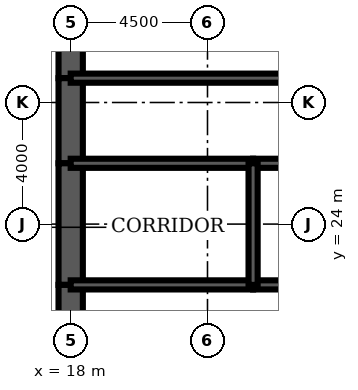
"""IFC4 building model, lengths in metres.
Left out: names, types, materials, properties, quantities, classifications, styles, units other than length and angle.
Written with IfcOpenShell. Run it as: python <this file> out.ifc"""

import sys

from ifc_helpers import new_model, si_unit, direction, frame, frame_2d, origin, place, context, subcontext, project, spatial, rectangle, extrude, element, fill, save


model = new_model("IFC4")
c1 = context("Model", 3, precision=1e-05, world=origin(), true_north=direction((0.0, 1.0)))
c2 = subcontext(c1, "Body", "Model", "MODEL_VIEW")
j1 = project(units=[si_unit("LENGTHUNIT", "METRE"), si_unit("PLANEANGLEUNIT", "RADIAN")], contexts=[c1])
p1 = place(None, origin())
s1 = spatial("IfcSite", under=j1, at=p1, CompositionType="ELEMENT")
p2 = place(p1, origin())
s2 = spatial("IfcBuilding", under=s1, at=p2, CompositionType="ELEMENT")
p3 = place(p2, frame((0.0, 0.0, 211.0)))
s3 = spatial("IfcBuildingStorey", under=s2, at=p3, CompositionType="ELEMENT", Elevation=211.0)
p4 = place(p3, frame((18.0, 32.0, 0.0), z_axis=(0.0, 0.0, 1.0), x_axis=(0.0, -1.0, 0.0)))
e1 = element("IfcWall", 1, at=p4, inside=s3, PredefinedType="SHEAR", context=c2, shape_type="SweptSolid", body=[
    extrude(rectangle(XDim=3.2, YDim=0.8, at=frame_2d((1.6, 0.0))), origin(), (0.0, 0.0, 1.0), 4.2),
])
p5 = place(p3, frame((18.0, 28.8, 0.0), z_axis=(0.0, 0.0, 1.0), x_axis=(0.0, -1.0, 0.0)))
e2 = element("IfcWall", 2, at=p5, inside=s3, PredefinedType="SHEAR", context=c2, shape_type="SweptSolid", body=[
    extrude(rectangle(XDim=2.8, YDim=0.8, at=frame_2d((1.4, 0.0))), origin(), (0.0, 0.0, 1.0), 4.2),
])
p6 = place(p5, frame((0.4, 0.0, 0.0)))
e3 = element("IfcOpeningElement", 3, at=p6, cuts=e2, PredefinedType="OPENING", context=c2, shape_type="SweptSolid", body=[
    extrude(rectangle(XDim=1.8, YDim=2.1, at=frame_2d((0.9, 1.05))), frame((0.0, 0.41, 0.0), z_axis=(0.0, -1.0, 0.0), x_axis=(1.0, 0.0, 0.0)), (0.0, 0.0, 1.0), 0.82),
])
p7 = place(p3, frame((18.0, 26.0, 0.0), z_axis=(0.0, 0.0, 1.0), x_axis=(0.0, -1.0, 0.0)))
e4 = element("IfcWall", 4, at=p7, inside=s3, PredefinedType="SHEAR", context=c2, shape_type="SweptSolid", body=[
    extrude(rectangle(XDim=4.0, YDim=0.8, at=frame_2d((2.0, 0.0))), origin(), (0.0, 0.0, 1.0), 4.2),
])
p8 = place(p3, frame((18.0, 22.0, 0.0), z_axis=(0.0, 0.0, 1.0), x_axis=(0.0, -1.0, 0.0)))
e5 = element("IfcWall", 5, at=p8, inside=s3, PredefinedType="SHEAR", context=c2, shape_type="SweptSolid", body=[
    extrude(rectangle(XDim=2.8, YDim=0.8, at=frame_2d((1.4, 0.0))), origin(), (0.0, 0.0, 1.0), 4.2),
])
p9 = place(p8, frame((0.6, 0.0, 0.0)))
e6 = element("IfcOpeningElement", 6, at=p9, cuts=e5, PredefinedType="OPENING", context=c2, shape_type="SweptSolid", body=[
    extrude(rectangle(XDim=1.8, YDim=2.1, at=frame_2d((0.9, 1.05))), frame((0.0, 0.41, 0.0), z_axis=(0.0, -1.0, 0.0), x_axis=(1.0, 0.0, 0.0)), (0.0, 0.0, 1.0), 0.82),
])
p10 = place(p3, frame((18.0, 28.8, 0.0), z_axis=(0.0, 0.0, 1.0), x_axis=(1.0, 0.0, 0.0)))
e7 = element("IfcWall", 7, at=p10, inside=s3, PredefinedType="SOLIDWALL", context=c2, shape_type="SweptSolid", body=[
    extrude(rectangle(XDim=9.0, YDim=0.3, at=frame_2d((4.5, 0.0))), origin(), (0.0, 0.0, 1.0), 4.2),
])
p11 = place(p10, frame((0.65, 0.0, 0.0)))
e8 = element("IfcOpeningElement", 8, at=p11, cuts=e7, PredefinedType="OPENING", context=c2, shape_type="SweptSolid", body=[
    extrude(rectangle(XDim=1.0, YDim=2.1, at=frame_2d((0.5, 1.05))), frame((0.0, 0.16, 0.0), z_axis=(0.0, -1.0, 0.0), x_axis=(1.0, 0.0, 0.0)), (0.0, 0.0, 1.0), 0.32),
])
p12 = place(p3, frame((18.0, 22.0, 0.0), z_axis=(0.0, 0.0, 1.0), x_axis=(1.0, 0.0, 0.0)))
e9 = element("IfcWall", 9, at=p12, inside=s3, PredefinedType="SOLIDWALL", context=c2, shape_type="SweptSolid", body=[
    extrude(rectangle(XDim=6.0, YDim=0.3, at=frame_2d((3.0, 0.0))), origin(), (0.0, 0.0, 1.0), 4.2),
])
p13 = place(p12, frame((2.0, 0.0, 0.0)))
e10 = element("IfcOpeningElement", 10, at=p13, cuts=e9, PredefinedType="OPENING", context=c2, shape_type="SweptSolid", body=[
    extrude(rectangle(XDim=1.0, YDim=2.1, at=frame_2d((0.5, 1.05))), frame((0.0, 0.16, 0.0), z_axis=(0.0, -1.0, 0.0), x_axis=(1.0, 0.0, 0.0)), (0.0, 0.0, 1.0), 0.32),
])
p14 = place(p3, frame((24.0, 22.0, 0.0), z_axis=(0.0, 0.0, 1.0), x_axis=(1.0, 0.0, 0.0)))
e11 = element("IfcWall", 11, at=p14, inside=s3, PredefinedType="SOLIDWALL", context=c2, shape_type="SweptSolid", body=[
    extrude(rectangle(XDim=3.0, YDim=0.3, at=frame_2d((1.5, 0.0))), origin(), (0.0, 0.0, 1.0), 4.2),
])
p15 = place(p14, frame((1.0, 0.0, 0.0)))
e12 = element("IfcOpeningElement", 12, at=p15, cuts=e11, PredefinedType="OPENING", context=c2, shape_type="SweptSolid", body=[
    extrude(rectangle(XDim=1.0, YDim=2.1, at=frame_2d((0.5, 1.05))), frame((0.0, 0.16, 0.0), z_axis=(0.0, -1.0, 0.0), x_axis=(1.0, 0.0, 0.0)), (0.0, 0.0, 1.0), 0.32),
])
p16 = place(p3, frame((18.0, 26.0, 0.0), z_axis=(0.0, 0.0, 1.0), x_axis=(1.0, 0.0, 0.0)))
e13 = element("IfcWall", 13, at=p16, inside=s3, PredefinedType="SOLIDWALL", context=c2, shape_type="SweptSolid", body=[
    extrude(rectangle(XDim=6.0, YDim=0.3, at=frame_2d((3.0, 0.0))), origin(), (0.0, 0.0, 1.0), 4.2),
])
p17 = place(p3, frame((24.0, 26.0, 0.0), z_axis=(0.0, 0.0, 1.0), x_axis=(1.0, 0.0, 0.0)))
e14 = element("IfcWall", 14, at=p17, inside=s3, PredefinedType="SOLIDWALL", context=c2, shape_type="SweptSolid", body=[
    extrude(rectangle(XDim=3.0, YDim=0.3, at=frame_2d((1.5, 0.0))), origin(), (0.0, 0.0, 1.0), 4.2),
])
p18 = place(p3, frame((24.0, 22.0, 0.0), z_axis=(0.0, 0.0, 1.0), x_axis=(0.0, 1.0, 0.0)))
e15 = element("IfcWall", 15, at=p18, inside=s3, PredefinedType="SOLIDWALL", context=c2, shape_type="SweptSolid", body=[
    extrude(rectangle(XDim=4.0, YDim=0.3, at=frame_2d((2.0, 0.0))), origin(), (0.0, 0.0, 1.0), 4.2),
])
p19 = place(p3, frame((22.2, 26.15, 0.0), z_axis=(0.0, 0.0, 1.0), x_axis=(0.0, 1.0, 0.0)))
e16 = element("IfcWall", 16, at=p19, inside=s3, PredefinedType="PARTITIONING", context=c2, shape_type="SweptSolid", body=[
    extrude(rectangle(XDim=2.5, YDim=0.15, at=frame_2d((1.25, 0.0))), origin(), (0.0, 0.0, 1.0), 3.0),
])
p20 = place(p19, frame((0.35, 0.0, 0.0)))
e17 = element("IfcOpeningElement", 17, at=p20, cuts=e16, PredefinedType="OPENING", context=c2, shape_type="SweptSolid", body=[
    extrude(rectangle(XDim=1.0, YDim=2.1, at=frame_2d((0.5, 1.05))), frame((0.0, 0.085, 0.0), z_axis=(0.0, -1.0, 0.0), x_axis=(1.0, 0.0, 0.0)), (0.0, 0.0, 1.0), 0.17),
])
p21 = place(p20, origin())
e18 = element("IfcDoor", 18, at=p21, inside=s3, OperationType="SINGLE_SWING_LEFT", PredefinedType="DOOR", context=c2, shape_type="SweptSolid", body=[
    extrude(rectangle(XDim=1.0, YDim=2.1, at=frame_2d((0.5, 1.05))), frame((0.0, 0.025, 0.0), z_axis=(0.0, -1.0, 0.0), x_axis=(1.0, 0.0, 0.0)), (0.0, 0.0, 1.0), 0.05),
])
fill(e17, e18)
p22 = place(p11, origin())
e19 = element("IfcDoor", 19, at=p22, inside=s3, OperationType="SINGLE_SWING_LEFT", PredefinedType="DOOR", context=c2, shape_type="SweptSolid", body=[
    extrude(rectangle(XDim=1.0, YDim=2.1, at=frame_2d((0.5, 1.05))), frame((0.0, 0.025, 0.0), z_axis=(0.0, -1.0, 0.0), x_axis=(1.0, 0.0, 0.0)), (0.0, 0.0, 1.0), 0.05),
])
fill(e8, e19)
p23 = place(p9, origin())
e20 = element("IfcDoor", 20, at=p23, inside=s3, OperationType="SINGLE_SWING_LEFT", PredefinedType="DOOR", context=c2, shape_type="SweptSolid", body=[
    extrude(rectangle(XDim=1.8, YDim=2.1, at=frame_2d((0.9, 1.05))), frame((0.0, 0.4, 0.0), z_axis=(0.0, -1.0, 0.0), x_axis=(1.0, 0.0, 0.0)), (0.0, 0.0, 1.0), 0.8),
])
fill(e6, e20)
p24 = place(p6, origin())
e21 = element("IfcDoor", 21, at=p24, inside=s3, OperationType="SINGLE_SWING_LEFT", PredefinedType="DOOR", context=c2, shape_type="SweptSolid", body=[
    extrude(rectangle(XDim=1.8, YDim=2.1, at=frame_2d((0.9, 1.05))), frame((0.0, 0.4, 0.0), z_axis=(0.0, -1.0, 0.0), x_axis=(1.0, 0.0, 0.0)), (0.0, 0.0, 1.0), 0.8),
])
fill(e3, e21)
p25 = place(p13, origin())
e22 = element("IfcDoor", 22, at=p25, inside=s3, OperationType="SINGLE_SWING_LEFT", PredefinedType="DOOR", context=c2, shape_type="SweptSolid", body=[
    extrude(rectangle(XDim=1.0, YDim=2.1, at=frame_2d((0.5, 1.05))), frame((0.0, 0.025, 0.0), z_axis=(0.0, -1.0, 0.0), x_axis=(1.0, 0.0, 0.0)), (0.0, 0.0, 1.0), 0.05),
])
fill(e10, e22)
save(model, sys.argv[1])
